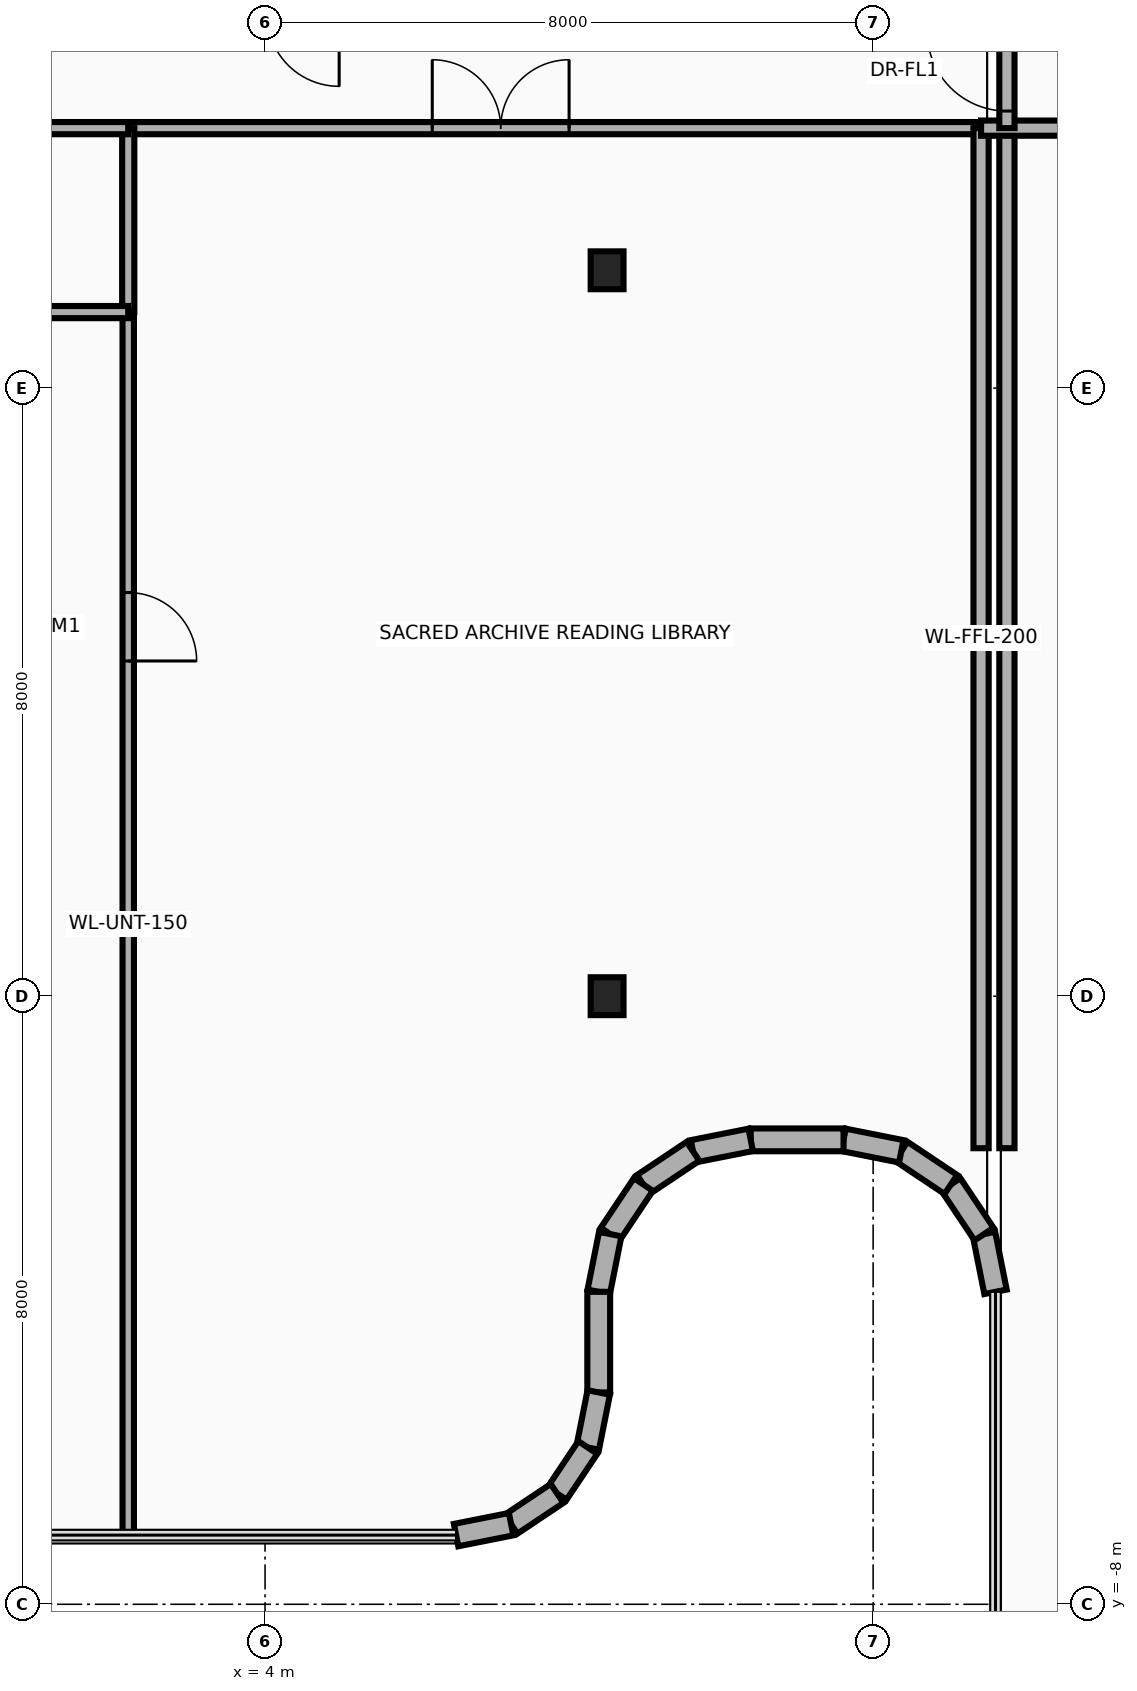
"""IFC4 building model, lengths in metres.
Left out: names, types, materials, properties, quantities, classifications, styles, units other than length and angle.
Written with IfcOpenShell. Run it as: python <this file> out.ifc"""

import sys

from ifc_helpers import new_model, si_unit, direction, frame, frame_2d, origin, origin_2d, place, context, subcontext, project, spatial, rectangle, i_section, extrude, source, transform, mapped, element, fill, save


model = new_model("IFC4")
c1 = context("Model", 3, precision=1e-05, world=origin(), true_north=direction((0.0, 1.0)))
c2 = subcontext(c1, "Body", "Model", "MODEL_VIEW")
j1 = project(units=[si_unit("LENGTHUNIT", "METRE"), si_unit("PLANEANGLEUNIT", "RADIAN")], contexts=[c1])
p1 = place(None, origin())
s1 = spatial("IfcSite", under=j1, at=p1, CompositionType="ELEMENT")
p2 = place(p1, origin())
s2 = spatial("IfcBuilding", under=s1, at=p2, CompositionType="ELEMENT")
p3 = place(p2, frame((0.0, 0.0, 176.55)))
s3 = spatial("IfcBuildingStorey", under=s2, at=p3, CompositionType="ELEMENT", Elevation=176.55)
m1 = source(origin(), c2, "Body", "SweptSolid", [
    extrude(i_section(OverallWidth=0.432, OverallDepth=0.498, WebThickness=0.056, FlangeThickness=0.089, at=origin_2d()), origin(), (0.0, 0.0, 1.0), 3.95),
])
for number, where, z_axis, x_axis in (
    (1, (8.5, 0.0, 0.0), (0.0, 0.0, 1.0), (1.0, 0.0, 0.0)),
    (2, (8.5, 9.55, 0.0), (0.0, 0.0, 1.0), (1.0, 0.0, 0.0)),
):
    element("IfcColumn", number, at=place(p3, frame(where, z_axis=z_axis, x_axis=x_axis)), inside=s3, PredefinedType="COLUMN", context=c2, shape_type="MappedRepresentation", body=[
        mapped(m1, transform((0.0, 0.0, 0.0), x_axis=(1.0, 0.0, 0.0), y_axis=(0.0, 1.0, 0.0), z_axis=(0.0, 0.0, 1.0), scale=1.0)),
    ])
p4 = place(p3, frame((13.61, -3.889, 0.0), z_axis=(0.0, 0.0, 1.0), x_axis=(-0.195206365311, 0.98076219082, 0.0)))
e3 = element("IfcWall", 3, at=p4, inside=s3, PredefinedType="SOLIDWALL", context=c2, shape_type="SweptSolid", body=[
    extrude(rectangle(XDim=0.774, YDim=0.3, at=frame_2d((0.387, 0.0))), origin(), (0.0, 0.0, 1.0), 3.63),
])
for number, where, z_axis, x_axis in (
    (4, (13.459, -3.13, 0.0), (0.0, 0.0, 1.0), (-0.556, 0.831, 0.0)),
    (5, (13.023, -2.477, 0.0), (0.0, 0.0, 1.0), (-0.831, 0.556, 0.0)),
):
    element("IfcWall", number, at=place(p3, frame(where, z_axis=z_axis, x_axis=x_axis)), inside=s3, PredefinedType="SOLIDWALL", context=c2, shape_type="SweptSolid", body=[
        extrude(rectangle(XDim=0.785, YDim=0.3, at=frame_2d((0.393, 0.0))), origin(), (0.0, 0.0, 1.0), 3.63),
    ])
p5 = place(p3, frame((12.37, -2.041, 0.0), z_axis=(0.0, 0.0, 1.0), x_axis=(-0.98076219082, 0.195206365311, 0.0)))
e6 = element("IfcWall", 6, at=p5, inside=s3, PredefinedType="SOLIDWALL", context=c2, shape_type="SweptSolid", body=[
    extrude(rectangle(XDim=0.774, YDim=0.3, at=frame_2d((0.387, 0.0))), origin(), (0.0, 0.0, 1.0), 3.63),
])
p6 = place(p3, frame((11.611, -1.89, 0.0), z_axis=(0.0, 0.0, 1.0), x_axis=(-1.0, 0.0, 0.0)))
e7 = element("IfcWall", 7, at=p6, inside=s3, PredefinedType="SOLIDWALL", context=c2, shape_type="SweptSolid", body=[
    extrude(rectangle(XDim=1.222, YDim=0.3, at=frame_2d((0.611, 0.0))), origin(), (0.0, 0.0, 1.0), 3.63),
])
p7 = place(p3, frame((10.389, -1.89, 0.0), z_axis=(0.0, 0.0, 1.0), x_axis=(-0.98076219082, -0.195206365311, 0.0)))
e8 = element("IfcWall", 8, at=p7, inside=s3, PredefinedType="SOLIDWALL", context=c2, shape_type="SweptSolid", body=[
    extrude(rectangle(XDim=0.774, YDim=0.3, at=frame_2d((0.387, 0.0))), origin(), (0.0, 0.0, 1.0), 3.63),
])
for number, where, z_axis, x_axis in (
    (9, (9.63, -2.041, 0.0), (0.0, 0.0, 1.0), (-0.831, -0.556, 0.0)),
    (10, (8.977, -2.477, 0.0), (0.0, 0.0, 1.0), (-0.556, -0.831, 0.0)),
):
    element("IfcWall", number, at=place(p3, frame(where, z_axis=z_axis, x_axis=x_axis)), inside=s3, PredefinedType="SOLIDWALL", context=c2, shape_type="SweptSolid", body=[
        extrude(rectangle(XDim=0.785, YDim=0.3, at=frame_2d((0.393, 0.0))), origin(), (0.0, 0.0, 1.0), 2.615),
    ])
p8 = place(p3, frame((8.541, -3.13, 0.0), z_axis=(0.0, 0.0, 1.0), x_axis=(-0.195206365311, -0.98076219082, 0.0)))
e11 = element("IfcWall", 11, at=p8, inside=s3, PredefinedType="SOLIDWALL", context=c2, shape_type="SweptSolid", body=[
    extrude(rectangle(XDim=0.774, YDim=0.3, at=frame_2d((0.387, 0.0))), origin(), (0.0, 0.0, 1.0), 2.615),
])
p9 = place(p3, frame((8.39, -3.889, 0.0), z_axis=(0.0, 0.0, 1.0), x_axis=(0.0, -1.0, 0.0)))
e12 = element("IfcWall", 12, at=p9, inside=s3, PredefinedType="SOLIDWALL", context=c2, shape_type="SweptSolid", body=[
    extrude(rectangle(XDim=1.324, YDim=0.3, at=frame_2d((0.662, 0.0))), origin(), (0.0, 0.0, 1.0), 2.615),
])
p10 = place(p3, frame((8.39, -5.213, 0.0), z_axis=(0.0, 0.0, 1.0), x_axis=(-0.194780446724, -0.980846867546, 0.0)))
e13 = element("IfcWall", 13, at=p10, inside=s3, PredefinedType="SOLIDWALL", context=c2, shape_type="SweptSolid", body=[
    extrude(rectangle(XDim=0.738, YDim=0.3, at=frame_2d((0.369, 0.0))), origin(), (0.0, 0.0, 1.0), 2.615),
])
p11 = place(p3, frame((8.246, -5.937, 0.0), z_axis=(0.0, 0.0, 1.0), x_axis=(-0.555784030735, -0.83132671747, 0.0)))
e14 = element("IfcWall", 14, at=p11, inside=s3, PredefinedType="SOLIDWALL", context=c2, shape_type="SweptSolid", body=[
    extrude(rectangle(XDim=0.728, YDim=0.3, at=frame_2d((0.364, 0.0))), origin(), (0.0, 0.0, 1.0), 2.615),
])
p12 = place(p3, frame((7.842, -6.542, 0.0), z_axis=(0.0, 0.0, 1.0), x_axis=(-0.831378135196, -0.555707113792, 0.0)))
e15 = element("IfcWall", 15, at=p12, inside=s3, PredefinedType="SOLIDWALL", context=c2, shape_type="SweptSolid", body=[
    extrude(rectangle(XDim=0.727, YDim=0.3, at=frame_2d((0.364, 0.0))), origin(), (0.0, 0.0, 1.0), 3.63),
])
p13 = place(p3, frame((7.237, -6.946, 0.0), z_axis=(0.0, 0.0, 1.0), x_axis=(-0.980783640462, -0.195098566376, 0.0)))
e16 = element("IfcWall", 16, at=p13, inside=s3, PredefinedType="SOLIDWALL", context=c2, shape_type="SweptSolid", body=[
    extrude(rectangle(XDim=0.738, YDim=0.3, at=frame_2d((0.369, 0.0))), origin(), (0.0, 0.0, 1.0), 3.076),
])
p14 = place(p3, frame((2.2, 11.42, 0.0), z_axis=(0.0, 0.0, 1.0), x_axis=(1.0, 0.0, 0.0)))
e17 = element("IfcWall", 17, at=p14, inside=s3, PredefinedType="PARTITIONING", context=c2, shape_type="SweptSolid", body=[
    extrude(rectangle(XDim=11.22, YDim=0.16, at=frame_2d((5.61, 0.0))), origin(), (0.0, 0.0, 1.0), 2.615),
])
p15 = place(p14, frame((4.0, 0.0, 0.0)))
e18 = element("IfcOpeningElement", 18, at=p15, cuts=e17, PredefinedType="OPENING", context=c2, shape_type="SweptSolid", body=[
    extrude(rectangle(XDim=1.8, YDim=2.15, at=frame_2d((0.9, 1.075))), frame((0.0, 0.095, 0.0), z_axis=(0.0, -1.0, 0.0), x_axis=(1.0, 0.0, 0.0)), (0.0, 0.0, 1.0), 0.19),
])
for number, where, z_axis, x_axis in (
    (19, (13.42, -2.0, 0.0), (0.0, 0.0, 1.0), (0.0, 1.0, 0.0)),
    (20, (13.76, -2.0, 0.0), (0.0, 0.0, 1.0), (0.0, 1.0, 0.0)),
):
    element("IfcWall", number, at=place(p3, frame(where, z_axis=z_axis, x_axis=x_axis)), inside=s3, PredefinedType="PARTITIONING", context=c2, shape_type="SweptSolid", body=[
        extrude(rectangle(XDim=13.42, YDim=0.2, at=frame_2d((6.71, 0.0))), origin(), (0.0, 0.0, 1.0), 2.665),
    ])
p16 = place(p3, frame((2.2, -7.09, 0.0), z_axis=(0.0, 0.0, 1.0), x_axis=(0.0, 1.0, 0.0)))
e21 = element("IfcWall", 21, at=p16, inside=s3, PredefinedType="PARTITIONING", context=c2, shape_type="SweptSolid", body=[
    extrude(rectangle(XDim=16.09, YDim=0.15, at=frame_2d((8.045, 0.0))), origin(), (0.0, 0.0, 1.0), 2.665),
])
p17 = place(p16, frame((11.5, 0.0, 0.0)))
e22 = element("IfcOpeningElement", 22, at=p17, cuts=e21, PredefinedType="OPENING", context=c2, shape_type="SweptSolid", body=[
    extrude(rectangle(XDim=0.9, YDim=2.1, at=frame_2d((0.45, 1.05))), frame((0.0, 0.09, 0.0), z_axis=(0.0, -1.0, 0.0), x_axis=(1.0, 0.0, 0.0)), (0.0, 0.0, 1.0), 0.18),
])
p18 = place(p3, frame((2.2, 9.0, 0.0), z_axis=(0.0, 0.0, 1.0), x_axis=(0.0, 1.0, 0.0)))
e23 = element("IfcWall", 23, at=p18, inside=s3, PredefinedType="PARTITIONING", context=c2, shape_type="SweptSolid", body=[
    extrude(rectangle(XDim=2.42, YDim=0.16, at=frame_2d((1.21, 0.0))), origin(), (0.0, 0.0, 1.0), 2.665),
])
p19 = place(p3, frame((-2.2, 9.0, 0.0), z_axis=(0.0, 0.0, 1.0), x_axis=(1.0, 0.0, 0.0)))
e24 = element("IfcWall", 24, at=p19, inside=s3, PredefinedType="PARTITIONING", context=c2, shape_type="SweptSolid", body=[
    extrude(rectangle(XDim=4.4, YDim=0.16, at=frame_2d((2.2, 0.0))), origin(), (0.0, 0.0, 1.0), 3.63),
])
p20 = place(p3, frame((-2.2, 11.42, 0.0), z_axis=(0.0, 0.0, 1.0), x_axis=(1.0, 0.0, 0.0)))
e25 = element("IfcWall", 25, at=p20, inside=s3, PredefinedType="PARTITIONING", context=c2, shape_type="SweptSolid", body=[
    extrude(rectangle(XDim=4.4, YDim=0.16, at=frame_2d((2.2, 0.0))), origin(), (0.0, 0.0, 1.0), 3.63),
])
p21 = place(p20, frame((0.3, 0.0, 0.0)))
e26 = element("IfcOpeningElement", 26, at=p21, cuts=e25, PredefinedType="OPENING", context=c2, shape_type="SweptSolid", body=[
    extrude(rectangle(XDim=0.85, YDim=2.1, at=frame_2d((0.425, 1.05))), frame((0.0, 0.095, 0.0), z_axis=(0.0, -1.0, 0.0), x_axis=(1.0, 0.0, 0.0)), (0.0, 0.0, 1.0), 0.19),
])
p22 = place(p20, frame((2.45, 0.0, 0.0)))
e27 = element("IfcOpeningElement", 27, at=p22, cuts=e25, PredefinedType="OPENING", context=c2, shape_type="SweptSolid", body=[
    extrude(rectangle(XDim=0.85, YDim=2.1, at=frame_2d((0.425, 1.05))), frame((0.0, 0.095, 0.0), z_axis=(0.0, -1.0, 0.0), x_axis=(1.0, 0.0, 0.0)), (0.0, 0.0, 1.0), 0.19),
])
p23 = place(p3, frame((13.42, 11.42, 0.0), z_axis=(0.0, 0.0, 1.0), x_axis=(1.0, 0.0, 0.0)))
e28 = element("IfcWall", 28, at=p23, inside=s3, PredefinedType="PARTITIONING", context=c2, shape_type="SweptSolid", body=[
    extrude(rectangle(XDim=1.98, YDim=0.2, at=frame_2d((0.99, 0.0))), origin(), (0.0, 0.0, 1.0), 3.004),
])
p24 = place(p3, frame((13.76, 11.42, 0.0), z_axis=(0.0, 0.0, 1.0), x_axis=(0.0, 1.0, 0.0)))
e29 = element("IfcWall", 29, at=p24, inside=s3, PredefinedType="PARTITIONING", context=c2, shape_type="SweptSolid", body=[
    extrude(rectangle(XDim=1.5, YDim=0.2, at=frame_2d((0.75, 0.0))), origin(), (0.0, 0.0, 1.0), 3.004),
])
p25 = place(p24, frame((0.225, 0.0, 0.0)))
e30 = element("IfcOpeningElement", 30, at=p25, cuts=e29, PredefinedType="OPENING", context=c2, shape_type="SweptSolid", body=[
    extrude(rectangle(XDim=1.05, YDim=2.15, at=frame_2d((0.525, 1.075))), frame((0.0, 0.115, 0.0), z_axis=(0.0, -1.0, 0.0), x_axis=(1.0, 0.0, 0.0)), (0.0, 0.0, 1.0), 0.23),
])
p26 = place(p15, origin())
e31 = element("IfcDoor", 31, at=p26, inside=s3, OperationType="DOUBLE_DOOR_SINGLE_SWING", PredefinedType="DOOR", context=c2, shape_type="SweptSolid", body=[
    extrude(rectangle(XDim=1.8, YDim=2.15, at=frame_2d((0.9, 1.075))), frame((0.0, 0.025, 0.0), z_axis=(0.0, -1.0, 0.0), x_axis=(1.0, 0.0, 0.0)), (0.0, 0.0, 1.0), 0.05),
])
fill(e18, e31)
p27 = place(p17, frame((0.9, 0.0, 0.0), z_axis=(0.0, 0.0, 1.0), x_axis=(-1.0, 0.0, 0.0)))
e32 = element("IfcDoor", 32, at=p27, inside=s3, OperationType="SINGLE_SWING_LEFT", PredefinedType="DOOR", context=c2, shape_type="SweptSolid", body=[
    extrude(rectangle(XDim=0.9, YDim=2.1, at=frame_2d((0.45, 1.05))), frame((0.0, 0.025, 0.0), z_axis=(0.0, -1.0, 0.0), x_axis=(1.0, 0.0, 0.0)), (0.0, 0.0, 1.0), 0.05),
])
fill(e22, e32)
p28 = place(p25, origin())
e33 = element("IfcDoor", 33, at=p28, inside=s3, OperationType="SINGLE_SWING_LEFT", PredefinedType="DOOR", context=c2, shape_type="SweptSolid", body=[
    extrude(rectangle(XDim=1.05, YDim=2.15, at=frame_2d((0.525, 1.075))), frame((0.0, 0.025, 0.0), z_axis=(0.0, -1.0, 0.0), x_axis=(1.0, 0.0, 0.0)), (0.0, 0.0, 1.0), 0.05),
])
fill(e30, e33)
save(model, sys.argv[1])
